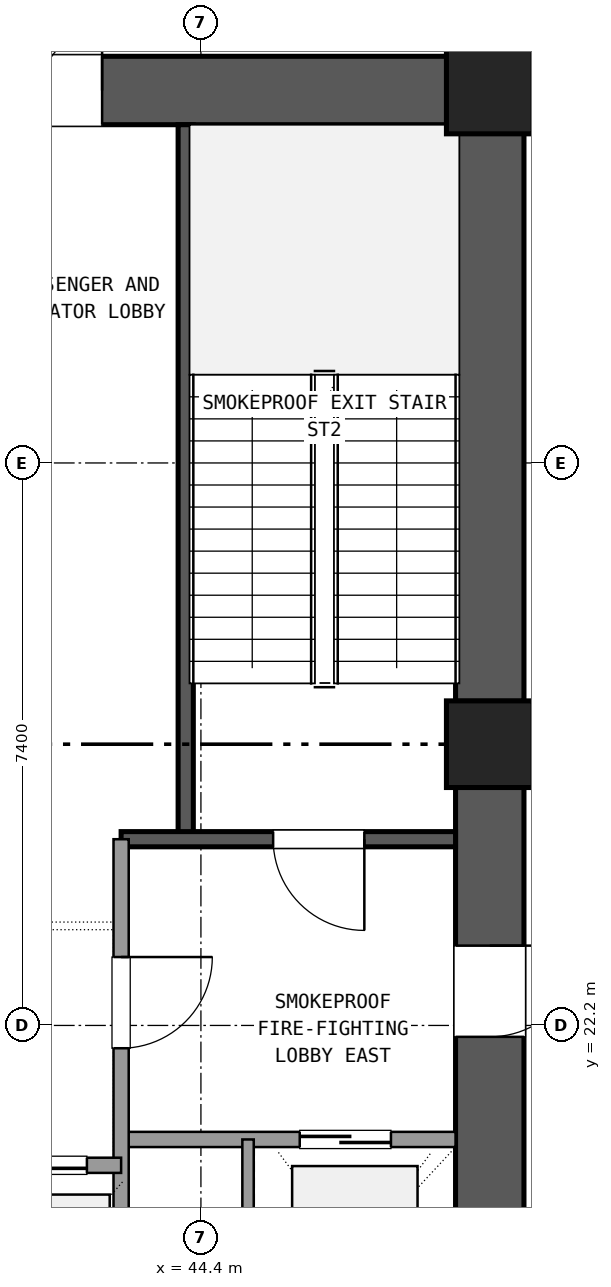
"""IFC4 building model, lengths in metres.
Left out: names, types, materials, properties, quantities, classifications, styles, units other than length and angle.
Written with IfcOpenShell. Run it as: python <this file> out.ifc"""

import sys

from ifc_helpers import new_model, si_unit, direction, frame, frame_2d, origin, origin_2d, place, context, subcontext, project, spatial, rectangle, extrude, element, fill, save


model = new_model("IFC4")
c1 = context("Model", 3, precision=1e-05, world=origin(), true_north=direction((0.0, 1.0)))
c2 = subcontext(c1, "Body", "Model", "MODEL_VIEW")
j1 = project(units=[si_unit("LENGTHUNIT", "METRE"), si_unit("PLANEANGLEUNIT", "RADIAN")], contexts=[c1])
p1 = place(None, origin())
s1 = spatial("IfcSite", under=j1, at=p1, CompositionType="ELEMENT")
p2 = place(p1, origin())
s2 = spatial("IfcBuilding", under=s1, at=p2, CompositionType="ELEMENT")
p3 = place(p2, origin())
s3 = spatial("IfcBuildingStorey", under=s2, at=p3, CompositionType="ELEMENT", Elevation=0.0)
for number, where, z_axis, x_axis in (
    (1, (48.2, 25.9, 0.0), (0.0, 0.0, 1.0), (1.0, 0.0, 0.0)),
    (2, (48.2, 34.5, 0.0), (0.0, 0.0, 1.0), (1.0, 0.0, 0.0)),
):
    element("IfcColumn", number, at=place(p3, frame(where, z_axis=z_axis, x_axis=x_axis)), inside=s3, PredefinedType="COLUMN", context=c2, shape_type="SweptSolid", body=[
        extrude(rectangle(XDim=1.14, YDim=1.14, at=origin_2d()), origin(), (0.0, 0.0, 1.0), 5.4),
    ])
p4 = place(p3, frame((48.2, 17.865, 0.0), z_axis=(0.0, 0.0, 1.0), x_axis=(0.0, 1.0, 0.0)))
e3 = element("IfcWall", 3, at=p4, inside=s3, PredefinedType="SHEAR", context=c2, shape_type="SweptSolid", body=[
    extrude(rectangle(XDim=7.47, YDim=0.9, at=frame_2d((3.735, 0.0))), origin(), (0.0, 0.0, 1.0), 5.1),
])
p5 = place(p4, frame((4.185, 0.0, 0.0)))
e4 = element("IfcOpeningElement", 4, at=p5, cuts=e3, PredefinedType="OPENING", context=c2, shape_type="SweptSolid", body=[
    extrude(rectangle(XDim=1.2, YDim=2.15, at=frame_2d((0.6, 1.075))), frame((0.0, 0.46, 0.0), z_axis=(0.0, -1.0, 0.0), x_axis=(1.0, 0.0, 0.0)), (0.0, 0.0, 1.0), 0.92),
])
p6 = place(p3, frame((48.2, 26.465, 0.0), z_axis=(0.0, 0.0, 1.0), x_axis=(0.0, 1.0, 0.0)))
e5 = element("IfcWall", 5, at=p6, inside=s3, PredefinedType="SHEAR", context=c2, shape_type="SweptSolid", body=[
    extrude(rectangle(XDim=7.47, YDim=0.9, at=frame_2d((3.735, 0.0))), origin(), (0.0, 0.0, 1.0), 5.1),
])
p7 = place(p3, frame((47.635, 34.5, 0.0), z_axis=(0.0, 0.0, 1.0), x_axis=(-1.0, 0.0, 0.0)))
e6 = element("IfcWall", 6, at=p7, inside=s3, PredefinedType="SHEAR", context=c2, shape_type="SweptSolid", body=[
    extrude(rectangle(XDim=10.07, YDim=0.9, at=frame_2d((5.035, 0.0))), origin(), (0.0, 0.0, 1.0), 5.1),
])
p8 = place(p7, frame((4.535, 0.0, 0.0)))
e7 = element("IfcOpeningElement", 7, at=p8, cuts=e6, PredefinedType="OPENING", context=c2, shape_type="SweptSolid", body=[
    extrude(rectangle(XDim=1.6, YDim=2.2, at=frame_2d((0.8, 1.1))), frame((0.0, 0.46, 0.0), z_axis=(0.0, -1.0, 0.0), x_axis=(1.0, 0.0, 0.0)), (0.0, 0.0, 1.0), 0.92),
])
p9 = place(p3, frame((44.2, 24.65, 0.0), z_axis=(0.0, 0.0, 1.0), x_axis=(0.0, 1.0, 0.0)))
e8 = element("IfcWall", 8, at=p9, inside=s3, PredefinedType="SHEAR", context=c2, shape_type="SweptSolid", body=[
    extrude(rectangle(XDim=9.4, YDim=0.2, at=frame_2d((4.7, 0.0))), origin(), (0.0, 0.0, 1.0), 5.1),
])
p10 = place(p3, frame((43.35, 24.65, 0.0), z_axis=(0.0, 0.0, 1.0), x_axis=(1.0, 0.0, 0.0)))
e9 = element("IfcWall", 9, at=p10, inside=s3, PredefinedType="SHEAR", context=c2, shape_type="SweptSolid", body=[
    extrude(rectangle(XDim=4.4, YDim=0.2, at=frame_2d((2.2, 0.0))), origin(), (0.0, 0.0, 1.0), 5.1),
])
p11 = place(p10, frame((2.0, 0.0, 0.0)))
e10 = element("IfcOpeningElement", 10, at=p11, cuts=e9, PredefinedType="OPENING", context=c2, shape_type="SweptSolid", body=[
    extrude(rectangle(XDim=1.2, YDim=2.15, at=frame_2d((0.6, 1.075))), frame((0.0, 0.11, 0.0), z_axis=(0.0, -1.0, 0.0), x_axis=(1.0, 0.0, 0.0)), (0.0, 0.0, 1.0), 0.22),
])
p12 = place(p3, frame((43.35, 20.7, 0.0), z_axis=(0.0, 0.0, 1.0), x_axis=(1.0, 0.0, 0.0)))
e11 = element("IfcWall", 11, at=p12, inside=s3, PredefinedType="SOLIDWALL", context=c2, shape_type="SweptSolid", body=[
    extrude(rectangle(XDim=4.4, YDim=0.2, at=frame_2d((2.2, 0.0))), origin(), (0.0, 0.0, 1.0), 4.11),
])
p13 = place(p12, frame((2.35, 0.0, 0.0)))
e12 = element("IfcOpeningElement", 12, at=p13, cuts=e11, PredefinedType="OPENING", context=c2, shape_type="SweptSolid", body=[
    extrude(rectangle(XDim=1.2, YDim=2.15, at=frame_2d((0.6, 1.075))), frame((0.0, 0.11, 0.0), z_axis=(0.0, -1.0, 0.0), x_axis=(1.0, 0.0, 0.0)), (0.0, 0.0, 1.0), 0.22),
])
p14 = place(p3, frame((43.35, 17.75, 0.0), z_axis=(0.0, 0.0, 1.0), x_axis=(0.0, 1.0, 0.0)))
e13 = element("IfcWall", 13, at=p14, inside=s3, PredefinedType="SOLIDWALL", context=c2, shape_type="SweptSolid", body=[
    extrude(rectangle(XDim=6.9, YDim=0.2, at=frame_2d((3.45, 0.0))), origin(), (0.0, 0.0, 1.0), 4.11),
])
p15 = place(p14, frame((4.15, 0.0, 0.0)))
e14 = element("IfcOpeningElement", 14, at=p15, cuts=e13, PredefinedType="OPENING", context=c2, shape_type="SweptSolid", body=[
    extrude(rectangle(XDim=1.2, YDim=2.15, at=frame_2d((0.6, 1.075))), frame((0.0, 0.11, 0.0), z_axis=(0.0, -1.0, 0.0), x_axis=(1.0, 0.0, 0.0)), (0.0, 0.0, 1.0), 0.22),
])
p16 = place(p3, frame((45.02, 17.75, 0.0), z_axis=(0.0, 0.0, 1.0), x_axis=(0.0, 1.0, 0.0)))
e15 = element("IfcWall", 15, at=p16, inside=s3, PredefinedType="PARTITIONING", context=c2, shape_type="SweptSolid", body=[
    extrude(rectangle(XDim=2.95, YDim=0.15, at=frame_2d((1.475, 0.0))), origin(), (0.0, 0.0, 1.0), 4.11),
])
p17 = place(p3, frame((37.25, 20.36, 0.0), z_axis=(0.0, 0.0, 1.0), x_axis=(1.0, 0.0, 0.0)))
e16 = element("IfcWall", 16, at=p17, inside=s3, PredefinedType="SOLIDWALL", context=c2, shape_type="SweptSolid", body=[
    extrude(rectangle(XDim=6.1, YDim=0.2, at=frame_2d((3.05, 0.0))), origin(), (0.0, 0.0, 1.0), 4.11),
])
p18 = place(p17, frame((0.45, 0.0, 0.0)))
e17 = element("IfcOpeningElement", 17, at=p18, cuts=e16, PredefinedType="OPENING", context=c2, shape_type="SweptSolid", body=[
    extrude(rectangle(XDim=1.1, YDim=2.15, at=frame_2d((0.55, 1.075))), frame((0.0, 0.11, 0.0), z_axis=(0.0, -1.0, 0.0), x_axis=(1.0, 0.0, 0.0)), (0.0, 0.0, 1.0), 0.22),
])
p19 = place(p17, frame((2.5, 0.0, 0.0)))
e18 = element("IfcOpeningElement", 18, at=p19, cuts=e16, PredefinedType="OPENING", context=c2, shape_type="SweptSolid", body=[
    extrude(rectangle(XDim=1.1, YDim=2.15, at=frame_2d((0.55, 1.075))), frame((0.0, 0.11, 0.0), z_axis=(0.0, -1.0, 0.0), x_axis=(1.0, 0.0, 0.0)), (0.0, 0.0, 1.0), 0.22),
])
p20 = place(p17, frame((4.55, 0.0, 0.0)))
e19 = element("IfcOpeningElement", 19, at=p20, cuts=e16, PredefinedType="OPENING", context=c2, shape_type="SweptSolid", body=[
    extrude(rectangle(XDim=1.1, YDim=2.15, at=frame_2d((0.55, 1.075))), frame((0.0, 0.11, 0.0), z_axis=(0.0, -1.0, 0.0), x_axis=(1.0, 0.0, 0.0)), (0.0, 0.0, 1.0), 0.22),
])
p21 = place(p3, frame((48.2, 34.98, 0.0), z_axis=(0.0, 0.0, 1.0), x_axis=(1.0, 0.0, 0.0)))
e20 = element("IfcWall", 20, at=p21, inside=s3, PredefinedType="SOLIDWALL", context=c2, shape_type="SweptSolid", body=[
    extrude(rectangle(XDim=4.08, YDim=0.2, at=frame_2d((2.04, 0.0))), origin(), (0.0, 0.0, 1.0), 4.11),
])
p22 = place(p21, frame((1.4, 0.0, 0.0)))
e21 = element("IfcOpeningElement", 21, at=p22, cuts=e20, PredefinedType="OPENING", context=c2, shape_type="SweptSolid", body=[
    extrude(rectangle(XDim=1.2, YDim=2.15, at=frame_2d((0.6, 1.075))), frame((0.0, 0.11, 0.0), z_axis=(0.0, -1.0, 0.0), x_axis=(1.0, 0.0, 0.0)), (0.0, 0.0, 1.0), 0.22),
])
p23 = place(p11, frame((1.2, 0.0, 0.0), z_axis=(0.0, 0.0, 1.0), x_axis=(-1.0, 0.0, 0.0)))
e22 = element("IfcDoor", 22, at=p23, inside=s3, OperationType="SINGLE_SWING_RIGHT", PredefinedType="DOOR", context=c2, shape_type="SweptSolid", body=[
    extrude(rectangle(XDim=1.2, YDim=2.15, at=frame_2d((0.6, 1.075))), frame((0.0, 0.025, 0.0), z_axis=(0.0, -1.0, 0.0), x_axis=(1.0, 0.0, 0.0)), (0.0, 0.0, 1.0), 0.05),
])
fill(e10, e22)
p24 = place(p13, origin())
e23 = element("IfcDoor", 23, at=p24, inside=s3, OperationType="SLIDING_TO_RIGHT", PredefinedType="DOOR", context=c2, shape_type="SweptSolid", body=[
    extrude(rectangle(XDim=1.2, YDim=2.15, at=frame_2d((0.6, 1.075))), frame((0.0, 0.025, 0.0), z_axis=(0.0, -1.0, 0.0), x_axis=(1.0, 0.0, 0.0)), (0.0, 0.0, 1.0), 0.05),
])
fill(e12, e23)
p25 = place(p15, frame((1.2, 0.0, 0.0), z_axis=(0.0, 0.0, 1.0), x_axis=(-1.0, 0.0, 0.0)))
e24 = element("IfcDoor", 24, at=p25, inside=s3, OperationType="SINGLE_SWING_RIGHT", PredefinedType="DOOR", context=c2, shape_type="SweptSolid", body=[
    extrude(rectangle(XDim=1.2, YDim=2.15, at=frame_2d((0.6, 1.075))), frame((0.0, 0.025, 0.0), z_axis=(0.0, -1.0, 0.0), x_axis=(1.0, 0.0, 0.0)), (0.0, 0.0, 1.0), 0.05),
])
fill(e14, e24)
p26 = place(p5, frame((1.2, 0.0, 0.0), z_axis=(0.0, 0.0, 1.0), x_axis=(-1.0, 0.0, 0.0)))
e25 = element("IfcDoor", 25, at=p26, inside=s3, OperationType="SINGLE_SWING_RIGHT", PredefinedType="DOOR", context=c2, shape_type="SweptSolid", body=[
    extrude(rectangle(XDim=1.2, YDim=2.15, at=frame_2d((0.6, 1.075))), frame((0.0, 0.025, 0.0), z_axis=(0.0, -1.0, 0.0), x_axis=(1.0, 0.0, 0.0)), (0.0, 0.0, 1.0), 0.05),
])
fill(e4, e25)
p27 = place(p8, frame((1.6, 0.0, 0.0), z_axis=(0.0, 0.0, 1.0), x_axis=(-1.0, 0.0, 0.0)))
e26 = element("IfcDoor", 26, at=p27, inside=s3, OperationType="DOUBLE_DOOR_SINGLE_SWING", PredefinedType="DOOR", context=c2, shape_type="SweptSolid", body=[
    extrude(rectangle(XDim=1.6, YDim=2.2, at=frame_2d((0.8, 1.1))), frame((0.0, 0.025, 0.0), z_axis=(0.0, -1.0, 0.0), x_axis=(1.0, 0.0, 0.0)), (0.0, 0.0, 1.0), 0.05),
])
fill(e7, e26)
p28 = place(p20, origin())
e27 = element("IfcDoor", 27, at=p28, inside=s3, OperationType="SLIDING_TO_LEFT", PredefinedType="DOOR", context=c2, shape_type="SweptSolid", body=[
    extrude(rectangle(XDim=1.1, YDim=2.15, at=frame_2d((0.55, 1.075))), frame((0.0, 0.025, 0.0), z_axis=(0.0, -1.0, 0.0), x_axis=(1.0, 0.0, 0.0)), (0.0, 0.0, 1.0), 0.05),
])
fill(e19, e27)
save(model, sys.argv[1])
